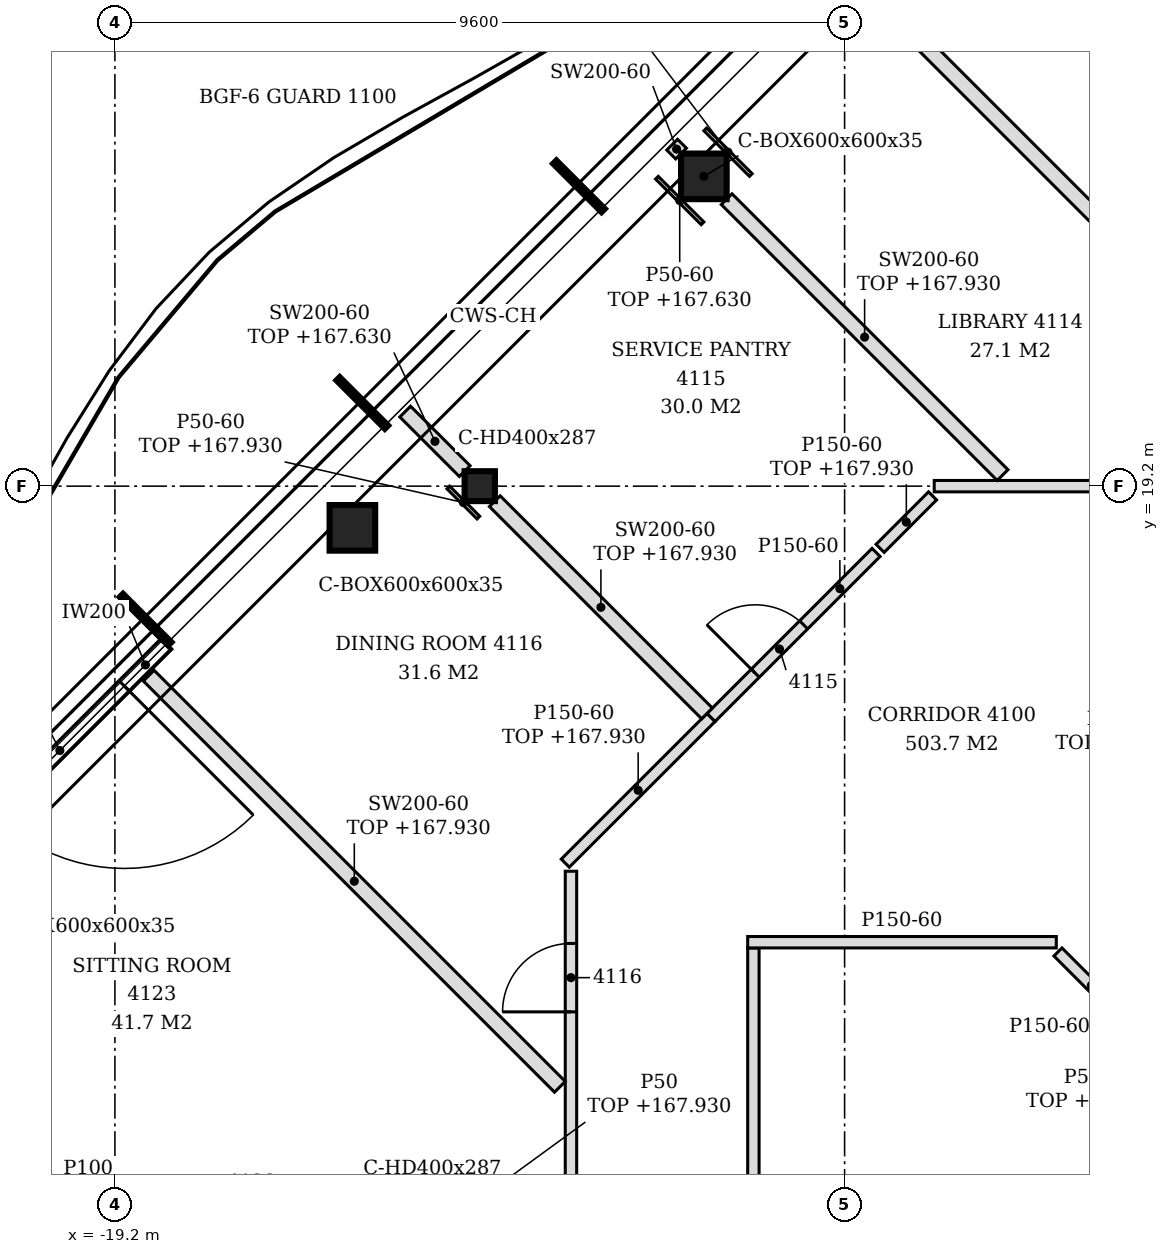
"""IFC4 building model, lengths in metres.
Left out: names, types, materials, properties, quantities, classifications, styles, units other than length and angle.
Written with IfcOpenShell. Run it as: python <this file> out.ifc"""

import sys

from ifc_helpers import new_model, si_unit, direction, frame, frame_2d, origin, origin_2d, place, context, subcontext, project, spatial, polyline, rectangle, hollow_rectangle, i_section, outline, extrude, element, fill, save


model = new_model("IFC4")
c1 = context("Model", 3, precision=1e-05, world=origin(), true_north=direction((0.0, 1.0)))
c2 = subcontext(c1, "Body", "Model", "MODEL_VIEW")
j1 = project(units=[si_unit("LENGTHUNIT", "METRE"), si_unit("PLANEANGLEUNIT", "RADIAN")], contexts=[c1])
p1 = place(None, origin())
s1 = spatial("IfcSite", under=j1, at=p1, CompositionType="ELEMENT")
p2 = place(p1, origin())
s2 = spatial("IfcBuilding", under=s1, at=p2, CompositionType="ELEMENT")
p3 = place(p2, frame((0.0, 0.0, 165.0)))
s3 = spatial("IfcBuildingStorey", under=s2, at=p3, CompositionType="ELEMENT", Elevation=165.0)
for number, where, z_axis, x_axis in (
    (1, (-11.451, 23.276, -0.15), (0.0, 0.0, 1.0), (1.0, 0.0, 0.0)),
    (2, (-16.076, 18.652, -0.15), (0.0, 0.0, 1.0), (1.0, 0.0, 0.0)),
):
    element("IfcColumn", number, at=place(p3, frame(where, z_axis=z_axis, x_axis=x_axis)), inside=s3, PredefinedType="COLUMN", context=c2, shape_type="SweptSolid", body=[
        extrude(hollow_rectangle(XDim=0.6, YDim=0.6, WallThickness=0.035, at=origin_2d()), origin(), (0.0, 0.0, 1.0), 3.6),
    ])
p4 = place(p3, frame((-14.4, 19.2, -0.15), z_axis=(0.0, 0.0, 1.0), x_axis=(1.0, 0.0, 0.0)))
e3 = element("IfcColumn", 3, at=p4, inside=s3, PredefinedType="COLUMN", context=c2, shape_type="SweptSolid", body=[
    extrude(i_section(OverallWidth=0.399, OverallDepth=0.393, WebThickness=0.023, FlangeThickness=0.037, FilletRadius=0.015, at=origin_2d()), origin(), (0.0, 0.0, 1.0), 3.6),
])
p5 = place(p3, frame((-18.521, 17.126, 0.0), z_axis=(0.0, 0.0, 1.0), x_axis=(-0.707106781187, -0.707106781187, 0.0)))
e4 = element("IfcWall", 4, at=p5, inside=s3, PredefinedType="NOTDEFINED", context=c2, shape_type="SweptSolid", body=[
    extrude(rectangle(XDim=3.962, YDim=0.2, at=frame_2d((1.981, 0.0))), origin(), (0.0, 0.0, 1.0), 3.45),
])
p6 = place(p5, frame((0.785, 0.0, 0.0)))
e5 = element("IfcOpeningElement", 5, at=p6, cuts=e4, PredefinedType="OPENING", context=c2, shape_type="SweptSolid", body=[
    extrude(rectangle(XDim=2.4, YDim=2.4, at=frame_2d((1.2, 1.2))), frame((0.0, 0.11, 0.0), z_axis=(0.0, -1.0, 0.0), x_axis=(1.0, 0.0, 0.0)), (0.0, 0.0, 1.0), 0.22),
])
p7 = place(p3, frame((-13.2, -3.5, 0.0), z_axis=(0.0, 0.0, 1.0), x_axis=(0.0, 1.0, 0.0)))
e6 = element("IfcWall", 6, at=p7, inside=s3, PredefinedType="PARTITIONING", context=c2, shape_type="SweptSolid", body=[
    extrude(outline(polyline([(0.0, 0.0), (17.634, 0.0), (17.634, 3.45), (13.2, 3.45), (13.198, 2.93), (13.0, 2.93), (12.998, 3.45), (8.4, 3.45), (8.398, 2.93), (8.2, 2.93), (8.198, 3.45), (3.6, 3.45), (3.598, 2.93), (3.4, 2.93), (3.398, 3.45), (0.0, 3.45), (0.0, 0.0)])), frame((0.0, 0.075, 0.0), z_axis=(0.0, -1.0, 0.0), x_axis=(1.0, 0.0, 0.0)), (0.0, 0.0, 1.0), 0.15),
])
p8 = place(p7, frame((15.784, 0.0, 0.0)))
e7 = element("IfcOpeningElement", 7, at=p8, cuts=e6, PredefinedType="OPENING", context=c2, shape_type="SweptSolid", body=[
    extrude(rectangle(XDim=0.9, YDim=2.1, at=frame_2d((0.45, 1.05))), frame((0.0, 0.085, 0.0), z_axis=(0.0, -1.0, 0.0), x_axis=(1.0, 0.0, 0.0)), (0.0, 0.0, 1.0), 0.17),
])
p9 = place(p7, frame((11.45, 0.0, 0.0)))
e8 = element("IfcOpeningElement", 8, at=p9, cuts=e6, PredefinedType="OPENING", context=c2, shape_type="SweptSolid", body=[
    extrude(rectangle(XDim=0.9, YDim=2.1, at=frame_2d((0.45, 1.05))), frame((0.0, 0.085, 0.0), z_axis=(0.0, -1.0, 0.0), x_axis=(1.0, 0.0, 0.0)), (0.0, 0.0, 1.0), 0.17),
])
p10 = place(p7, frame((4.25, 0.0, 0.0)))
e9 = element("IfcOpeningElement", 9, at=p10, cuts=e6, PredefinedType="OPENING", context=c2, shape_type="SweptSolid", body=[
    extrude(rectangle(XDim=0.9, YDim=2.1, at=frame_2d((0.45, 1.05))), frame((0.0, 0.085, 0.0), z_axis=(0.0, -1.0, 0.0), x_axis=(1.0, 0.0, 0.0)), (0.0, 0.0, 1.0), 0.17),
])
p11 = place(p7, frame((1.353, 0.0, 0.0)))
e10 = element("IfcOpeningElement", 10, at=p11, cuts=e6, PredefinedType="OPENING", context=c2, shape_type="SweptSolid", body=[
    extrude(rectangle(XDim=0.9, YDim=2.1, at=frame_2d((0.45, 1.05))), frame((0.0, 0.085, 0.0), z_axis=(0.0, -1.0, 0.0), x_axis=(1.0, 0.0, 0.0)), (0.0, 0.0, 1.0), 0.17),
])
p12 = place(p3, frame((-10.8, -2.506, 0.0), z_axis=(0.0, 0.0, 1.0), x_axis=(0.0, 1.0, 0.0)))
e11 = element("IfcWall", 11, at=p12, inside=s3, PredefinedType="PARTITIONING", context=c2, shape_type="SweptSolid", body=[
    extrude(outline(polyline([(0.0, 0.0), (15.631, 0.0), (15.631, 3.45), (12.206, 3.45), (12.204, 2.93), (12.006, 2.93), (12.004, 3.45), (7.406, 3.45), (7.404, 2.93), (7.206, 2.93), (7.204, 3.45), (2.606, 3.45), (2.604, 2.93), (2.406, 2.93), (2.404, 3.45), (0.0, 3.45), (0.0, 0.0)])), frame((0.0, 0.075, 0.0), z_axis=(0.0, -1.0, 0.0), x_axis=(1.0, 0.0, 0.0)), (0.0, 0.0, 1.0), 0.15),
])
p13 = place(p3, frame((-13.346, 11.298, 0.0), z_axis=(0.0, 0.0, 1.0), x_axis=(-0.707106781187, 0.707106781187, 0.0)))
e12 = element("IfcWall", 12, at=p13, inside=s3, PredefinedType="PARTITIONING", context=c2, shape_type="SweptSolid", body=[
    extrude(rectangle(XDim=7.65, YDim=0.2, at=frame_2d((3.825, 0.0))), origin(), (0.0, 0.0, 1.0), 2.93),
])
p14 = place(p3, frame((-5.914, 12.192, 0.0), z_axis=(0.0, 0.0, 1.0), x_axis=(-0.706812296552, 0.70740114323, 0.0)))
e13 = element("IfcWall", 13, at=p14, inside=s3, PredefinedType="PARTITIONING", context=c2, shape_type="SweptSolid", body=[
    extrude(rectangle(XDim=1.244, YDim=0.15, at=frame_2d((0.622, 0.0))), origin(), (0.0, 0.0, 1.0), 3.45),
])
p15 = place(p3, frame((-10.875, 13.2, 0.0), z_axis=(0.0, 0.0, 1.0), x_axis=(1.0, 0.0, 0.0)))
e14 = element("IfcWall", 14, at=p15, inside=s3, PredefinedType="PARTITIONING", context=c2, shape_type="SweptSolid", body=[
    extrude(rectangle(XDim=4.06, YDim=0.15, at=frame_2d((2.03, 0.0))), origin(), (0.0, 0.0, 1.0), 3.45),
])
p16 = place(p3, frame((-13.275, 14.24, 0.0), z_axis=(0.0, 0.0, 1.0), x_axis=(0.707286821097, 0.706926695424, 0.0)))
e15 = element("IfcWall", 15, at=p16, inside=s3, PredefinedType="PARTITIONING", context=c2, shape_type="SweptSolid", body=[
    extrude(rectangle(XDim=2.712, YDim=0.15, at=frame_2d((1.356, 0.0))), origin(), (0.0, 0.0, 1.0), 2.93),
])
p17 = place(p3, frame((-11.357, 16.157, 0.0), z_axis=(0.0, 0.0, 1.0), x_axis=(0.707106781187, 0.707106781187, 0.0)))
e16 = element("IfcWall", 16, at=p17, inside=s3, PredefinedType="PARTITIONING", context=c2, shape_type="SweptSolid", body=[
    extrude(rectangle(XDim=3.071, YDim=0.15, at=frame_2d((1.535, 0.0))), origin(), (0.0, 0.0, 1.0), 3.45),
])
p18 = place(p17, frame((0.823, 0.0, 0.0)))
e17 = element("IfcOpeningElement", 17, at=p18, cuts=e16, PredefinedType="OPENING", context=c2, shape_type="SweptSolid", body=[
    extrude(rectangle(XDim=0.9, YDim=2.1, at=frame_2d((0.45, 1.05))), frame((0.0, 0.085, 0.0), z_axis=(0.0, -1.0, 0.0), x_axis=(1.0, 0.0, 0.0)), (0.0, 0.0, 1.0), 0.17),
])
p19 = place(p3, frame((-11.41, 16.21, 0.0), z_axis=(0.0, 0.0, 1.0), x_axis=(-0.707106781187, 0.707106781187, 0.0)))
e18 = element("IfcWall", 18, at=p19, inside=s3, PredefinedType="PARTITIONING", context=c2, shape_type="SweptSolid", body=[
    extrude(rectangle(XDim=3.948, YDim=0.2, at=frame_2d((1.974, 0.0))), origin(), (0.0, 0.0, 1.0), 2.93),
])
p20 = place(p3, frame((-9.133, 18.381, 0.0), z_axis=(0.0, 0.0, 1.0), x_axis=(0.706731558776, 0.707481804593, 0.0)))
e19 = element("IfcWall", 19, at=p20, inside=s3, PredefinedType="PARTITIONING", context=c2, shape_type="SweptSolid", body=[
    extrude(rectangle(XDim=0.976, YDim=0.15, at=frame_2d((0.488, 0.0))), origin(), (0.0, 0.0, 1.0), 2.93),
])
p21 = place(p3, frame((-8.421, 19.2, 0.0), z_axis=(0.0, 0.0, 1.0), x_axis=(1.0, 0.0, 0.0)))
e20 = element("IfcWall", 20, at=p21, inside=s3, PredefinedType="PARTITIONING", context=c2, shape_type="SweptSolid", body=[
    extrude(outline(polyline([(0.0, 0.0), (31.242, 0.0), (31.242, 2.88), (27.771, 2.88), (27.769, 2.73), (27.471, 2.73), (27.469, 2.88), (15.771, 2.88), (15.769, 2.73), (15.471, 2.73), (15.469, 2.88), (3.771, 2.88), (3.769, 2.73), (3.471, 2.73), (3.469, 2.88), (0.0, 2.88), (0.0, 0.0)])), frame((0.0, 0.075, 0.0), z_axis=(0.0, -1.0, 0.0), x_axis=(1.0, 0.0, 0.0)), (0.0, 0.0, 1.0), 0.15),
])
p22 = place(p21, frame((25.997, 0.0, 0.0)))
e21 = element("IfcOpeningElement", 21, at=p22, cuts=e20, PredefinedType="OPENING", context=c2, shape_type="SweptSolid", body=[
    extrude(rectangle(XDim=0.9, YDim=2.1, at=frame_2d((0.45, 1.05))), frame((0.0, 0.085, 0.0), z_axis=(0.0, -1.0, 0.0), x_axis=(1.0, 0.0, 0.0)), (0.0, 0.0, 1.0), 0.17),
])
p23 = place(p21, frame((17.93, 0.0, 0.0)))
e22 = element("IfcOpeningElement", 22, at=p23, cuts=e20, PredefinedType="OPENING", context=c2, shape_type="SweptSolid", body=[
    extrude(rectangle(XDim=0.9, YDim=2.1, at=frame_2d((0.45, 1.05))), frame((0.0, 0.085, 0.0), z_axis=(0.0, -1.0, 0.0), x_axis=(1.0, 0.0, 0.0)), (0.0, 0.0, 1.0), 0.17),
])
p24 = place(p21, frame((14.754, 0.0, 0.0)))
e23 = element("IfcOpeningElement", 23, at=p24, cuts=e20, PredefinedType="OPENING", context=c2, shape_type="SweptSolid", body=[
    extrude(rectangle(XDim=0.9, YDim=2.1, at=frame_2d((0.45, 1.05))), frame((0.0, 0.085, 0.0), z_axis=(0.0, -1.0, 0.0), x_axis=(1.0, 0.0, 0.0)), (0.0, 0.0, 1.0), 0.17),
])
p25 = place(p21, frame((9.057, 0.0, 0.0)))
e24 = element("IfcOpeningElement", 24, at=p25, cuts=e20, PredefinedType="OPENING", context=c2, shape_type="SweptSolid", body=[
    extrude(rectangle(XDim=0.9, YDim=2.1, at=frame_2d((0.45, 1.05))), frame((0.0, 0.085, 0.0), z_axis=(0.0, -1.0, 0.0), x_axis=(1.0, 0.0, 0.0)), (0.0, 0.0, 1.0), 0.17),
])
p26 = place(p21, frame((2.907, 0.0, 0.0)))
e25 = element("IfcOpeningElement", 25, at=p26, cuts=e20, PredefinedType="OPENING", context=c2, shape_type="SweptSolid", body=[
    extrude(rectangle(XDim=0.9, YDim=2.1, at=frame_2d((0.45, 1.05))), frame((0.0, 0.085, 0.0), z_axis=(0.0, -1.0, 0.0), x_axis=(1.0, 0.0, 0.0)), (0.0, 0.0, 1.0), 0.17),
])
p27 = place(p3, frame((-7.522, 19.346, 0.0), z_axis=(0.0, 0.0, 1.0), x_axis=(-0.707106781187, 0.707106781187, 0.0)))
e26 = element("IfcWall", 26, at=p27, inside=s3, PredefinedType="PARTITIONING", context=c2, shape_type="SweptSolid", body=[
    extrude(rectangle(XDim=5.134, YDim=0.2, at=frame_2d((2.567, 0.0))), origin(), (0.0, 0.0, 1.0), 2.93),
])
p28 = place(p3, frame((-2.898, 19.346, 0.0), z_axis=(0.0, 0.0, 1.0), x_axis=(-0.707106781187, 0.707106781187, 0.0)))
e27 = element("IfcWall", 27, at=p28, inside=s3, PredefinedType="PARTITIONING", context=c2, shape_type="SweptSolid", body=[
    extrude(rectangle(XDim=9.347, YDim=0.2, at=frame_2d((4.674, 0.0))), origin(), (0.0, 0.0, 1.0), 2.73),
])
p29 = place(p3, frame((-14.598, 19.398, 0.0), z_axis=(0.0, 0.0, 1.0), x_axis=(-0.707106781187, 0.707106781187, 0.0)))
e28 = element("IfcWall", 28, at=p29, inside=s3, PredefinedType="PARTITIONING", context=c2, shape_type="SweptSolid", body=[
    extrude(rectangle(XDim=1.107, YDim=0.2, at=frame_2d((0.554, 0.0))), origin(), (0.0, 0.0, 1.0), 2.63),
])
p30 = place(p3, frame((-11.752, 23.576, 0.0), z_axis=(0.0, 0.0, 1.0), x_axis=(-0.707106781187, 0.707106781187, 0.0)))
e29 = element("IfcWall", 29, at=p30, inside=s3, PredefinedType="PARTITIONING", context=c2, shape_type="SweptSolid", body=[
    extrude(rectangle(XDim=0.166, YDim=0.2, at=frame_2d((0.083, 0.0))), origin(), (0.0, 0.0, 1.0), 3.45),
])
p31 = place(p3, frame((-14.418, 18.786, 0.0), z_axis=(0.0, 0.0, 1.0), x_axis=(-0.707106781187, 0.707106781187, 0.0)))
e30 = element("IfcWall", 30, at=p31, inside=s3, PredefinedType="PARTITIONING", context=c2, shape_type="SweptSolid", body=[
    extrude(rectangle(XDim=0.56, YDim=0.05, at=frame_2d((0.28, 0.0))), origin(), (0.0, 0.0, 1.0), 2.93),
])
p32 = place(p3, frame((-11.469, 22.658, 0.0), z_axis=(0.0, 0.0, 1.0), x_axis=(-0.706962899457, 0.707250633645, 0.0)))
e31 = element("IfcWall", 31, at=p32, inside=s3, PredefinedType="PARTITIONING", context=c2, shape_type="SweptSolid", body=[
    extrude(rectangle(XDim=0.848, YDim=0.05, at=frame_2d((0.424, 0.0))), origin(), (0.0, 0.0, 1.0), 2.63),
])
p33 = place(p3, frame((-10.834, 23.293, 0.0), z_axis=(0.0, 0.0, 1.0), x_axis=(-0.707250633645, 0.706962899457, 0.0)))
e32 = element("IfcWall", 32, at=p33, inside=s3, PredefinedType="PARTITIONING", context=c2, shape_type="SweptSolid", body=[
    extrude(rectangle(XDim=0.848, YDim=0.05, at=frame_2d((0.424, 0.0))), origin(), (0.0, 0.0, 1.0), 2.93),
])
p34 = place(p6, origin())
e33 = element("IfcDoor", 33, at=p34, inside=s3, OperationType="SINGLE_SWING_LEFT", PredefinedType="DOOR", context=c2, shape_type="SweptSolid", body=[
    extrude(rectangle(XDim=2.4, YDim=2.4, at=frame_2d((1.2, 1.2))), frame((0.0, 0.025, 0.0), z_axis=(0.0, -1.0, 0.0), x_axis=(1.0, 0.0, 0.0)), (0.0, 0.0, 1.0), 0.05),
])
fill(e5, e33)
p35 = place(p18, origin())
e34 = element("IfcDoor", 34, at=p35, inside=s3, OperationType="SINGLE_SWING_LEFT", PredefinedType="DOOR", context=c2, shape_type="SweptSolid", body=[
    extrude(rectangle(XDim=0.9, YDim=2.1, at=frame_2d((0.45, 1.05))), frame((0.0, 0.025, 0.0), z_axis=(0.0, -1.0, 0.0), x_axis=(1.0, 0.0, 0.0)), (0.0, 0.0, 1.0), 0.05),
])
fill(e17, e34)
p36 = place(p8, origin())
e35 = element("IfcDoor", 35, at=p36, inside=s3, OperationType="SINGLE_SWING_LEFT", PredefinedType="DOOR", context=c2, shape_type="SweptSolid", body=[
    extrude(rectangle(XDim=0.9, YDim=2.1, at=frame_2d((0.45, 1.05))), frame((0.0, 0.025, 0.0), z_axis=(0.0, -1.0, 0.0), x_axis=(1.0, 0.0, 0.0)), (0.0, 0.0, 1.0), 0.05),
])
fill(e7, e35)
save(model, sys.argv[1])
